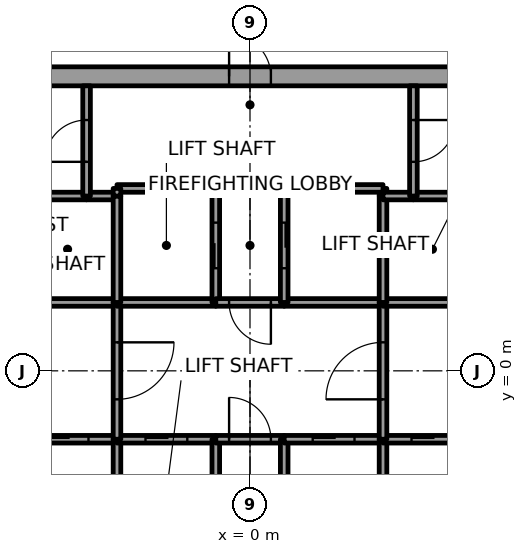
"""IFC4 building model, lengths in metres.
Left out: names, types, materials, properties, quantities, classifications, styles, units other than length and angle.
Written with IfcOpenShell. Run it as: python <this file> out.ifc"""

import sys

from ifc_helpers import new_model, si_unit, direction, frame, frame_2d, origin, place, context, subcontext, project, spatial, rectangle, extrude, element, fill, save


model = new_model("IFC4")
c1 = context("Model", 3, precision=1e-05, world=origin(), true_north=direction((0.0, 1.0)))
c2 = subcontext(c1, "Body", "Model", "MODEL_VIEW")
j1 = project(units=[si_unit("LENGTHUNIT", "METRE"), si_unit("PLANEANGLEUNIT", "RADIAN")], contexts=[c1])
p1 = place(None, origin())
s1 = spatial("IfcSite", under=j1, at=p1, CompositionType="ELEMENT")
p2 = place(p1, origin())
s2 = spatial("IfcBuilding", under=s1, at=p2, CompositionType="ELEMENT")
p3 = place(p2, frame((0.0, 0.0, 103.5)))
s3 = spatial("IfcBuildingStorey", under=s2, at=p3, CompositionType="ELEMENT", Elevation=103.5)
p4 = place(p3, frame((-11.0, 7.75, 0.0), z_axis=(0.0, 0.0, 1.0), x_axis=(1.0, 0.0, 0.0)))
e1 = element("IfcWall", 1, at=p4, inside=s3, PredefinedType="SHEAR", context=c2, shape_type="SweptSolid", body=[
    extrude(rectangle(XDim=22.0, YDim=0.5, at=frame_2d((11.0, 0.0))), origin(), (0.0, 0.0, 1.0), 3.7),
])
p5 = place(p4, frame((10.45, 0.0, 0.0)))
e2 = element("IfcOpeningElement", 2, at=p5, cuts=e1, PredefinedType="OPENING", context=c2, shape_type="SweptSolid", body=[
    extrude(rectangle(XDim=1.1, YDim=2.1, at=frame_2d((0.55, 1.05))), frame((0.0, 0.25, 0.0), z_axis=(0.0, -1.0, 0.0), x_axis=(1.0, 0.0, 0.0)), (0.0, 0.0, 1.0), 0.5),
])
p6 = place(p3, frame((-6.1, -1.8, 0.0), z_axis=(0.0, 0.0, 1.0), x_axis=(1.0, 0.0, 0.0)))
e3 = element("IfcWall", 3, at=p6, inside=s3, PredefinedType="SOLIDWALL", context=c2, shape_type="SweptSolid", body=[
    extrude(rectangle(XDim=2.6, YDim=0.2, at=frame_2d((1.3, 0.0))), origin(), (0.0, 0.0, 1.0), 3.55),
])
p7 = place(p6, frame((0.75, 0.0, 0.0)))
e4 = element("IfcOpeningElement", 4, at=p7, cuts=e3, PredefinedType="OPENING", context=c2, shape_type="SweptSolid", body=[
    extrude(rectangle(XDim=1.1, YDim=2.1, at=frame_2d((0.55, 1.05))), frame((0.0, 0.1, 0.0), z_axis=(0.0, -1.0, 0.0), x_axis=(1.0, 0.0, 0.0)), (0.0, 0.0, 1.0), 0.2),
])
p8 = place(p3, frame((-3.5, 1.8, 0.0), z_axis=(0.0, 0.0, 1.0), x_axis=(-1.0, 0.0, 0.0)))
e5 = element("IfcWall", 5, at=p8, inside=s3, PredefinedType="SOLIDWALL", context=c2, shape_type="SweptSolid", body=[
    extrude(rectangle(XDim=2.6, YDim=0.2, at=frame_2d((1.3, 0.0))), origin(), (0.0, 0.0, 1.0), 3.55),
])
p9 = place(p3, frame((-4.3, 4.6, 0.0), z_axis=(0.0, 0.0, 1.0), x_axis=(-1.0, 0.0, 0.0)))
e6 = element("IfcWall", 6, at=p9, inside=s3, PredefinedType="SOLIDWALL", context=c2, shape_type="SweptSolid", body=[
    extrude(rectangle(XDim=1.8, YDim=0.2, at=frame_2d((0.9, 0.0))), origin(), (0.0, 0.0, 1.0), 3.55),
])
p10 = place(p3, frame((-3.5, 4.6, 0.0), z_axis=(0.0, 0.0, 1.0), x_axis=(-1.0, 0.0, 0.0)))
e7 = element("IfcWall", 7, at=p10, inside=s3, PredefinedType="SOLIDWALL", context=c2, shape_type="SweptSolid", body=[
    extrude(rectangle(XDim=0.8, YDim=0.2, at=frame_2d((0.4, 0.0))), origin(), (0.0, 0.0, 1.0), 3.55),
])
p11 = place(p3, frame((-4.3, 4.6, 0.0), z_axis=(0.0, 0.0, 1.0), x_axis=(0.0, 1.0, 0.0)))
e8 = element("IfcWall", 8, at=p11, inside=s3, PredefinedType="SOLIDWALL", context=c2, shape_type="SweptSolid", body=[
    extrude(rectangle(XDim=2.9, YDim=0.2, at=frame_2d((1.45, 0.0))), origin(), (0.0, 0.0, 1.0), 3.55),
])
p12 = place(p11, frame((0.9, 0.0, 0.0)))
e9 = element("IfcOpeningElement", 9, at=p12, cuts=e8, PredefinedType="OPENING", context=c2, shape_type="SweptSolid", body=[
    extrude(rectangle(XDim=1.1, YDim=2.1, at=frame_2d((0.55, 1.05))), frame((0.0, 0.1, 0.0), z_axis=(0.0, -1.0, 0.0), x_axis=(1.0, 0.0, 0.0)), (0.0, 0.0, 1.0), 0.2),
])
p13 = place(p3, frame((-3.5, -4.6, 0.0), z_axis=(0.0, 0.0, 1.0), x_axis=(0.0, 1.0, 0.0)))
e10 = element("IfcWall", 10, at=p13, inside=s3, PredefinedType="SOLIDWALL", context=c2, shape_type="SweptSolid", body=[
    extrude(rectangle(XDim=2.8, YDim=0.2, at=frame_2d((1.4, 0.0))), origin(), (0.0, 0.0, 1.0), 3.55),
])
p14 = place(p3, frame((-3.5, -1.8, 0.0), z_axis=(0.0, 0.0, 1.0), x_axis=(1.0, 0.0, 0.0)))
e11 = element("IfcWall", 11, at=p14, inside=s3, PredefinedType="SOLIDWALL", context=c2, shape_type="SweptSolid", body=[
    extrude(rectangle(XDim=2.6, YDim=0.2, at=frame_2d((1.3, 0.0))), origin(), (0.0, 0.0, 1.0), 3.55),
])
p15 = place(p14, frame((0.75, 0.0, 0.0)))
e12 = element("IfcOpeningElement", 12, at=p15, cuts=e11, PredefinedType="OPENING", context=c2, shape_type="SweptSolid", body=[
    extrude(rectangle(XDim=1.1, YDim=2.1, at=frame_2d((0.55, 1.05))), frame((0.0, 0.1, 0.0), z_axis=(0.0, -1.0, 0.0), x_axis=(1.0, 0.0, 0.0)), (0.0, 0.0, 1.0), 0.2),
])
p16 = place(p3, frame((-3.5, 1.8, 0.0), z_axis=(0.0, 0.0, 1.0), x_axis=(0.0, -1.0, 0.0)))
e13 = element("IfcWall", 13, at=p16, inside=s3, PredefinedType="SOLIDWALL", context=c2, shape_type="SweptSolid", body=[
    extrude(rectangle(XDim=3.6, YDim=0.2, at=frame_2d((1.8, 0.0))), origin(), (0.0, 0.0, 1.0), 3.55),
])
p17 = place(p16, frame((1.05, 0.0, 0.0)))
e14 = element("IfcOpeningElement", 14, at=p17, cuts=e13, PredefinedType="OPENING", context=c2, shape_type="SweptSolid", body=[
    extrude(rectangle(XDim=1.5, YDim=2.1, at=frame_2d((0.75, 1.05))), frame((0.0, 0.1, 0.0), z_axis=(0.0, -1.0, 0.0), x_axis=(1.0, 0.0, 0.0)), (0.0, 0.0, 1.0), 0.2),
])
p18 = place(p3, frame((-0.9, 1.8, 0.0), z_axis=(0.0, 0.0, 1.0), x_axis=(-1.0, 0.0, 0.0)))
e15 = element("IfcWall", 15, at=p18, inside=s3, PredefinedType="SOLIDWALL", context=c2, shape_type="SweptSolid", body=[
    extrude(rectangle(XDim=2.6, YDim=0.2, at=frame_2d((1.3, 0.0))), origin(), (0.0, 0.0, 1.0), 3.55),
])
p19 = place(p3, frame((-3.5, 4.6, 0.0), z_axis=(0.0, 0.0, 1.0), x_axis=(0.0, -1.0, 0.0)))
e16 = element("IfcWall", 16, at=p19, inside=s3, PredefinedType="SOLIDWALL", context=c2, shape_type="SweptSolid", body=[
    extrude(rectangle(XDim=2.8, YDim=0.2, at=frame_2d((1.4, 0.0))), origin(), (0.0, 0.0, 1.0), 3.55),
])
p20 = place(p3, frame((-0.9, 1.8, 0.0), z_axis=(0.0, 0.0, 1.0), x_axis=(0.0, 1.0, 0.0)))
e17 = element("IfcWall", 17, at=p20, inside=s3, PredefinedType="SOLIDWALL", context=c2, shape_type="SweptSolid", body=[
    extrude(rectangle(XDim=3.0, YDim=0.2, at=frame_2d((1.5, 0.0))), origin(), (0.0, 0.0, 1.0), 3.55),
])
p21 = place(p20, frame((0.9, 0.0, 0.0)))
e18 = element("IfcOpeningElement", 18, at=p21, cuts=e17, PredefinedType="OPENING", context=c2, shape_type="SweptSolid", body=[
    extrude(rectangle(XDim=1.2, YDim=2.1, at=frame_2d((0.6, 1.05))), frame((0.0, 0.1, 0.0), z_axis=(0.0, -1.0, 0.0), x_axis=(1.0, 0.0, 0.0)), (0.0, 0.0, 1.0), 0.2),
])
p22 = place(p3, frame((-0.9, 4.8, 0.0), z_axis=(0.0, 0.0, 1.0), x_axis=(-1.0, 0.0, 0.0)))
e19 = element("IfcWall", 19, at=p22, inside=s3, PredefinedType="SOLIDWALL", context=c2, shape_type="SweptSolid", body=[
    extrude(rectangle(XDim=2.6, YDim=0.2, at=frame_2d((1.3, 0.0))), origin(), (0.0, 0.0, 1.0), 3.55),
])
p23 = place(p3, frame((-3.5, 4.8, 0.0), z_axis=(0.0, 0.0, 1.0), x_axis=(0.0, -1.0, 0.0)))
e20 = element("IfcWall", 20, at=p23, inside=s3, PredefinedType="SOLIDWALL", context=c2, shape_type="SweptSolid", body=[
    extrude(rectangle(XDim=0.2, YDim=0.2, at=frame_2d((0.1, 0.0))), origin(), (0.0, 0.0, 1.0), 3.55),
])
p24 = place(p3, frame((-0.9, -4.6, 0.0), z_axis=(0.0, 0.0, 1.0), x_axis=(0.0, 1.0, 0.0)))
e21 = element("IfcWall", 21, at=p24, inside=s3, PredefinedType="SOLIDWALL", context=c2, shape_type="SweptSolid", body=[
    extrude(rectangle(XDim=2.8, YDim=0.2, at=frame_2d((1.4, 0.0))), origin(), (0.0, 0.0, 1.0), 3.55),
])
p25 = place(p3, frame((-0.9, -1.8, 0.0), z_axis=(0.0, 0.0, 1.0), x_axis=(1.0, 0.0, 0.0)))
e22 = element("IfcWall", 22, at=p25, inside=s3, PredefinedType="SOLIDWALL", context=c2, shape_type="SweptSolid", body=[
    extrude(rectangle(XDim=1.8, YDim=0.2, at=frame_2d((0.9, 0.0))), origin(), (0.0, 0.0, 1.0), 3.55),
])
p26 = place(p25, frame((0.35, 0.0, 0.0)))
e23 = element("IfcOpeningElement", 23, at=p26, cuts=e22, PredefinedType="OPENING", context=c2, shape_type="SweptSolid", body=[
    extrude(rectangle(XDim=1.1, YDim=2.1, at=frame_2d((0.55, 1.05))), frame((0.0, 0.1, 0.0), z_axis=(0.0, -1.0, 0.0), x_axis=(1.0, 0.0, 0.0)), (0.0, 0.0, 1.0), 0.2),
])
p27 = place(p3, frame((0.9, 1.8, 0.0), z_axis=(0.0, 0.0, 1.0), x_axis=(-1.0, 0.0, 0.0)))
e24 = element("IfcWall", 24, at=p27, inside=s3, PredefinedType="SOLIDWALL", context=c2, shape_type="SweptSolid", body=[
    extrude(rectangle(XDim=1.8, YDim=0.2, at=frame_2d((0.9, 0.0))), origin(), (0.0, 0.0, 1.0), 3.55),
])
p28 = place(p27, frame((0.35, 0.0, 0.0)))
e25 = element("IfcOpeningElement", 25, at=p28, cuts=e24, PredefinedType="OPENING", context=c2, shape_type="SweptSolid", body=[
    extrude(rectangle(XDim=1.1, YDim=2.1, at=frame_2d((0.55, 1.05))), frame((0.0, 0.1, 0.0), z_axis=(0.0, -1.0, 0.0), x_axis=(1.0, 0.0, 0.0)), (0.0, 0.0, 1.0), 0.2),
])
p29 = place(p3, frame((0.9, -1.8, 0.0), z_axis=(0.0, 0.0, 1.0), x_axis=(0.0, -1.0, 0.0)))
e26 = element("IfcWall", 26, at=p29, inside=s3, PredefinedType="SOLIDWALL", context=c2, shape_type="SweptSolid", body=[
    extrude(rectangle(XDim=2.8, YDim=0.2, at=frame_2d((1.4, 0.0))), origin(), (0.0, 0.0, 1.0), 3.55),
])
p30 = place(p3, frame((0.9, -1.8, 0.0), z_axis=(0.0, 0.0, 1.0), x_axis=(1.0, 0.0, 0.0)))
e27 = element("IfcWall", 27, at=p30, inside=s3, PredefinedType="SOLIDWALL", context=c2, shape_type="SweptSolid", body=[
    extrude(rectangle(XDim=2.6, YDim=0.2, at=frame_2d((1.3, 0.0))), origin(), (0.0, 0.0, 1.0), 3.55),
])
p31 = place(p30, frame((0.75, 0.0, 0.0)))
e28 = element("IfcOpeningElement", 28, at=p31, cuts=e27, PredefinedType="OPENING", context=c2, shape_type="SweptSolid", body=[
    extrude(rectangle(XDim=1.1, YDim=2.1, at=frame_2d((0.55, 1.05))), frame((0.0, 0.1, 0.0), z_axis=(0.0, -1.0, 0.0), x_axis=(1.0, 0.0, 0.0)), (0.0, 0.0, 1.0), 0.2),
])
p32 = place(p3, frame((3.5, 1.8, 0.0), z_axis=(0.0, 0.0, 1.0), x_axis=(-1.0, 0.0, 0.0)))
e29 = element("IfcWall", 29, at=p32, inside=s3, PredefinedType="SOLIDWALL", context=c2, shape_type="SweptSolid", body=[
    extrude(rectangle(XDim=2.6, YDim=0.2, at=frame_2d((1.3, 0.0))), origin(), (0.0, 0.0, 1.0), 3.55),
])
p33 = place(p3, frame((3.5, 4.6, 0.0), z_axis=(0.0, 0.0, 1.0), x_axis=(0.0, 1.0, 0.0)))
e30 = element("IfcWall", 30, at=p33, inside=s3, PredefinedType="SOLIDWALL", context=c2, shape_type="SweptSolid", body=[
    extrude(rectangle(XDim=0.2, YDim=0.2, at=frame_2d((0.1, 0.0))), origin(), (0.0, 0.0, 1.0), 3.55),
])
p34 = place(p3, frame((3.5, 4.8, 0.0), z_axis=(0.0, 0.0, 1.0), x_axis=(-1.0, 0.0, 0.0)))
e31 = element("IfcWall", 31, at=p34, inside=s3, PredefinedType="SOLIDWALL", context=c2, shape_type="SweptSolid", body=[
    extrude(rectangle(XDim=2.6, YDim=0.2, at=frame_2d((1.3, 0.0))), origin(), (0.0, 0.0, 1.0), 3.55),
])
p35 = place(p3, frame((0.9, 4.8, 0.0), z_axis=(0.0, 0.0, 1.0), x_axis=(0.0, -1.0, 0.0)))
e32 = element("IfcWall", 32, at=p35, inside=s3, PredefinedType="SOLIDWALL", context=c2, shape_type="SweptSolid", body=[
    extrude(rectangle(XDim=3.0, YDim=0.2, at=frame_2d((1.5, 0.0))), origin(), (0.0, 0.0, 1.0), 3.55),
])
p36 = place(p35, frame((0.9, 0.0, 0.0)))
e33 = element("IfcOpeningElement", 33, at=p36, cuts=e32, PredefinedType="OPENING", context=c2, shape_type="SweptSolid", body=[
    extrude(rectangle(XDim=1.2, YDim=2.1, at=frame_2d((0.6, 1.05))), frame((0.0, 0.1, 0.0), z_axis=(0.0, -1.0, 0.0), x_axis=(1.0, 0.0, 0.0)), (0.0, 0.0, 1.0), 0.2),
])
p37 = place(p3, frame((3.5, -4.6, 0.0), z_axis=(0.0, 0.0, 1.0), x_axis=(0.0, 1.0, 0.0)))
e34 = element("IfcWall", 34, at=p37, inside=s3, PredefinedType="SOLIDWALL", context=c2, shape_type="SweptSolid", body=[
    extrude(rectangle(XDim=2.8, YDim=0.2, at=frame_2d((1.4, 0.0))), origin(), (0.0, 0.0, 1.0), 3.55),
])
p38 = place(p3, frame((3.5, -1.8, 0.0), z_axis=(0.0, 0.0, 1.0), x_axis=(1.0, 0.0, 0.0)))
e35 = element("IfcWall", 35, at=p38, inside=s3, PredefinedType="SOLIDWALL", context=c2, shape_type="SweptSolid", body=[
    extrude(rectangle(XDim=2.6, YDim=0.2, at=frame_2d((1.3, 0.0))), origin(), (0.0, 0.0, 1.0), 3.55),
])
p39 = place(p38, frame((0.75, 0.0, 0.0)))
e36 = element("IfcOpeningElement", 36, at=p39, cuts=e35, PredefinedType="OPENING", context=c2, shape_type="SweptSolid", body=[
    extrude(rectangle(XDim=1.1, YDim=2.1, at=frame_2d((0.55, 1.05))), frame((0.0, 0.1, 0.0), z_axis=(0.0, -1.0, 0.0), x_axis=(1.0, 0.0, 0.0)), (0.0, 0.0, 1.0), 0.2),
])
p40 = place(p3, frame((3.5, -1.8, 0.0), z_axis=(0.0, 0.0, 1.0), x_axis=(0.0, 1.0, 0.0)))
e37 = element("IfcWall", 37, at=p40, inside=s3, PredefinedType="SOLIDWALL", context=c2, shape_type="SweptSolid", body=[
    extrude(rectangle(XDim=3.6, YDim=0.2, at=frame_2d((1.8, 0.0))), origin(), (0.0, 0.0, 1.0), 3.55),
])
p41 = place(p40, frame((1.05, 0.0, 0.0)))
e38 = element("IfcOpeningElement", 38, at=p41, cuts=e37, PredefinedType="OPENING", context=c2, shape_type="SweptSolid", body=[
    extrude(rectangle(XDim=1.5, YDim=2.1, at=frame_2d((0.75, 1.05))), frame((0.0, 0.1, 0.0), z_axis=(0.0, -1.0, 0.0), x_axis=(1.0, 0.0, 0.0)), (0.0, 0.0, 1.0), 0.2),
])
p42 = place(p3, frame((6.1, 1.8, 0.0), z_axis=(0.0, 0.0, 1.0), x_axis=(-1.0, 0.0, 0.0)))
e39 = element("IfcWall", 39, at=p42, inside=s3, PredefinedType="SOLIDWALL", context=c2, shape_type="SweptSolid", body=[
    extrude(rectangle(XDim=2.6, YDim=0.2, at=frame_2d((1.3, 0.0))), origin(), (0.0, 0.0, 1.0), 3.55),
])
p43 = place(p3, frame((3.5, 1.8, 0.0), z_axis=(0.0, 0.0, 1.0), x_axis=(0.0, 1.0, 0.0)))
e40 = element("IfcWall", 40, at=p43, inside=s3, PredefinedType="SOLIDWALL", context=c2, shape_type="SweptSolid", body=[
    extrude(rectangle(XDim=2.8, YDim=0.2, at=frame_2d((1.4, 0.0))), origin(), (0.0, 0.0, 1.0), 3.55),
])
p44 = place(p3, frame((4.3, 4.6, 0.0), z_axis=(0.0, 0.0, 1.0), x_axis=(-1.0, 0.0, 0.0)))
e41 = element("IfcWall", 41, at=p44, inside=s3, PredefinedType="SOLIDWALL", context=c2, shape_type="SweptSolid", body=[
    extrude(rectangle(XDim=0.8, YDim=0.2, at=frame_2d((0.4, 0.0))), origin(), (0.0, 0.0, 1.0), 3.55),
])
p45 = place(p3, frame((6.1, 4.6, 0.0), z_axis=(0.0, 0.0, 1.0), x_axis=(-1.0, 0.0, 0.0)))
e42 = element("IfcWall", 42, at=p45, inside=s3, PredefinedType="SOLIDWALL", context=c2, shape_type="SweptSolid", body=[
    extrude(rectangle(XDim=1.8, YDim=0.2, at=frame_2d((0.9, 0.0))), origin(), (0.0, 0.0, 1.0), 3.55),
])
p46 = place(p3, frame((4.3, 7.5, 0.0), z_axis=(0.0, 0.0, 1.0), x_axis=(0.0, -1.0, 0.0)))
e43 = element("IfcWall", 43, at=p46, inside=s3, PredefinedType="SOLIDWALL", context=c2, shape_type="SweptSolid", body=[
    extrude(rectangle(XDim=2.9, YDim=0.2, at=frame_2d((1.45, 0.0))), origin(), (0.0, 0.0, 1.0), 3.55),
])
p47 = place(p46, frame((0.9, 0.0, 0.0)))
e44 = element("IfcOpeningElement", 44, at=p47, cuts=e43, PredefinedType="OPENING", context=c2, shape_type="SweptSolid", body=[
    extrude(rectangle(XDim=1.1, YDim=2.1, at=frame_2d((0.55, 1.05))), frame((0.0, 0.1, 0.0), z_axis=(0.0, -1.0, 0.0), x_axis=(1.0, 0.0, 0.0)), (0.0, 0.0, 1.0), 0.2),
])
p48 = place(p7, origin())
e45 = element("IfcDoor", 45, at=p48, inside=s3, OperationType="SLIDING_TO_RIGHT", PredefinedType="DOOR", context=c2, shape_type="SweptSolid", body=[
    extrude(rectangle(XDim=1.1, YDim=2.1, at=frame_2d((0.55, 1.05))), frame((0.0, 0.025, 0.0), z_axis=(0.0, -1.0, 0.0), x_axis=(1.0, 0.0, 0.0)), (0.0, 0.0, 1.0), 0.05),
])
fill(e4, e45)
p49 = place(p15, origin())
e46 = element("IfcDoor", 46, at=p49, inside=s3, OperationType="SLIDING_TO_RIGHT", PredefinedType="DOOR", context=c2, shape_type="SweptSolid", body=[
    extrude(rectangle(XDim=1.1, YDim=2.1, at=frame_2d((0.55, 1.05))), frame((0.0, 0.025, 0.0), z_axis=(0.0, -1.0, 0.0), x_axis=(1.0, 0.0, 0.0)), (0.0, 0.0, 1.0), 0.05),
])
fill(e12, e46)
p50 = place(p31, origin())
e47 = element("IfcDoor", 47, at=p50, inside=s3, OperationType="SLIDING_TO_RIGHT", PredefinedType="DOOR", context=c2, shape_type="SweptSolid", body=[
    extrude(rectangle(XDim=1.1, YDim=2.1, at=frame_2d((0.55, 1.05))), frame((0.0, 0.025, 0.0), z_axis=(0.0, -1.0, 0.0), x_axis=(1.0, 0.0, 0.0)), (0.0, 0.0, 1.0), 0.05),
])
fill(e28, e47)
p51 = place(p39, origin())
e48 = element("IfcDoor", 48, at=p51, inside=s3, OperationType="SLIDING_TO_LEFT", PredefinedType="DOOR", context=c2, shape_type="SweptSolid", body=[
    extrude(rectangle(XDim=1.1, YDim=2.1, at=frame_2d((0.55, 1.05))), frame((0.0, 0.025, 0.0), z_axis=(0.0, -1.0, 0.0), x_axis=(1.0, 0.0, 0.0)), (0.0, 0.0, 1.0), 0.05),
])
fill(e36, e48)
p52 = place(p21, origin())
e49 = element("IfcDoor", 49, at=p52, inside=s3, OperationType="SLIDING_TO_RIGHT", PredefinedType="DOOR", context=c2, shape_type="SweptSolid", body=[
    extrude(rectangle(XDim=1.2, YDim=2.1, at=frame_2d((0.6, 1.05))), frame((0.0, 0.025, 0.0), z_axis=(0.0, -1.0, 0.0), x_axis=(1.0, 0.0, 0.0)), (0.0, 0.0, 1.0), 0.05),
])
fill(e18, e49)
p53 = place(p36, origin())
e50 = element("IfcDoor", 50, at=p53, inside=s3, OperationType="SLIDING_TO_RIGHT", PredefinedType="DOOR", context=c2, shape_type="SweptSolid", body=[
    extrude(rectangle(XDim=1.2, YDim=2.1, at=frame_2d((0.6, 1.05))), frame((0.0, 0.025, 0.0), z_axis=(0.0, -1.0, 0.0), x_axis=(1.0, 0.0, 0.0)), (0.0, 0.0, 1.0), 0.05),
])
fill(e33, e50)
p54 = place(p17, origin())
e51 = element("IfcDoor", 51, at=p54, inside=s3, OperationType="DOUBLE_DOOR_SINGLE_SWING", PredefinedType="DOOR", context=c2, shape_type="SweptSolid", body=[
    extrude(rectangle(XDim=1.5, YDim=2.1, at=frame_2d((0.75, 1.05))), frame((0.0, 0.025, 0.0), z_axis=(0.0, -1.0, 0.0), x_axis=(1.0, 0.0, 0.0)), (0.0, 0.0, 1.0), 0.05),
])
fill(e14, e51)
p55 = place(p41, origin())
e52 = element("IfcDoor", 52, at=p55, inside=s3, OperationType="DOUBLE_DOOR_SINGLE_SWING", PredefinedType="DOOR", context=c2, shape_type="SweptSolid", body=[
    extrude(rectangle(XDim=1.5, YDim=2.1, at=frame_2d((0.75, 1.05))), frame((0.0, 0.025, 0.0), z_axis=(0.0, -1.0, 0.0), x_axis=(1.0, 0.0, 0.0)), (0.0, 0.0, 1.0), 0.05),
])
fill(e38, e52)
p56 = place(p28, origin())
e53 = element("IfcDoor", 53, at=p56, inside=s3, OperationType="SINGLE_SWING_LEFT", PredefinedType="DOOR", context=c2, shape_type="SweptSolid", body=[
    extrude(rectangle(XDim=1.1, YDim=2.1, at=frame_2d((0.55, 1.05))), frame((0.0, 0.025, 0.0), z_axis=(0.0, -1.0, 0.0), x_axis=(1.0, 0.0, 0.0)), (0.0, 0.0, 1.0), 0.05),
])
fill(e25, e53)
p57 = place(p26, origin())
e54 = element("IfcDoor", 54, at=p57, inside=s3, OperationType="SINGLE_SWING_RIGHT", PredefinedType="DOOR", context=c2, shape_type="SweptSolid", body=[
    extrude(rectangle(XDim=1.1, YDim=2.1, at=frame_2d((0.55, 1.05))), frame((0.0, 0.025, 0.0), z_axis=(0.0, -1.0, 0.0), x_axis=(1.0, 0.0, 0.0)), (0.0, 0.0, 1.0), 0.05),
])
fill(e23, e54)
p58 = place(p12, origin())
e55 = element("IfcDoor", 55, at=p58, inside=s3, OperationType="SINGLE_SWING_RIGHT", PredefinedType="DOOR", context=c2, shape_type="SweptSolid", body=[
    extrude(rectangle(XDim=1.1, YDim=2.1, at=frame_2d((0.55, 1.05))), frame((0.0, 0.025, 0.0), z_axis=(0.0, -1.0, 0.0), x_axis=(1.0, 0.0, 0.0)), (0.0, 0.0, 1.0), 0.05),
])
fill(e9, e55)
p59 = place(p47, origin())
e56 = element("IfcDoor", 56, at=p59, inside=s3, OperationType="SINGLE_SWING_LEFT", PredefinedType="DOOR", context=c2, shape_type="SweptSolid", body=[
    extrude(rectangle(XDim=1.1, YDim=2.1, at=frame_2d((0.55, 1.05))), frame((0.0, 0.025, 0.0), z_axis=(0.0, -1.0, 0.0), x_axis=(1.0, 0.0, 0.0)), (0.0, 0.0, 1.0), 0.05),
])
fill(e44, e56)
p60 = place(p5, origin())
e57 = element("IfcDoor", 57, at=p60, inside=s3, OperationType="SINGLE_SWING_RIGHT", PredefinedType="DOOR", context=c2, shape_type="SweptSolid", body=[
    extrude(rectangle(XDim=1.1, YDim=2.1, at=frame_2d((0.55, 1.05))), frame((0.0, 0.025, 0.0), z_axis=(0.0, -1.0, 0.0), x_axis=(1.0, 0.0, 0.0)), (0.0, 0.0, 1.0), 0.05),
])
fill(e2, e57)
save(model, sys.argv[1])
